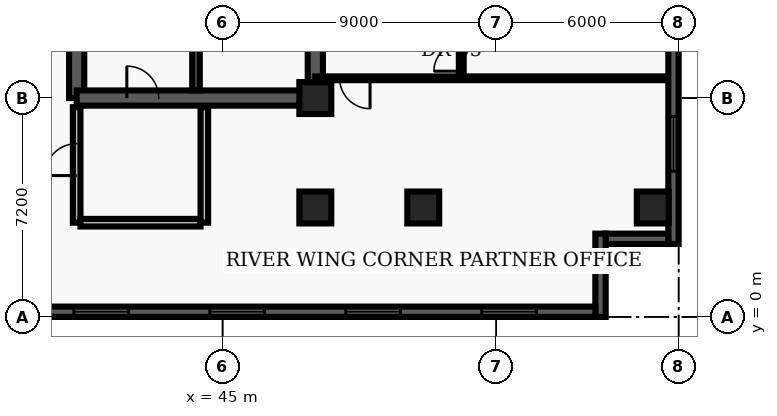
"""IFC4 building model, lengths in metres.
Left out: names, types, materials, properties, quantities, classifications, styles, units other than length and angle.
Written with IfcOpenShell. Run it as: python <this file> out.ifc"""

import sys

from ifc_helpers import new_model, entity, si_unit, converted_unit, direction, frame, origin_with_axes, origin_2d_with_axis, place, context, subcontext, project, spatial, polyline, rectangle, outline, extrude, element, fill, save


model = new_model("IFC4")
c1 = context("Model", 3, precision=1e-05, world=origin_with_axes(), true_north=direction((0.0, 1.0)))
c2 = subcontext(c1, "Body", "Model", "MODEL_VIEW")
j1 = project(units=[si_unit("LENGTHUNIT", "METRE"), converted_unit("PLANEANGLEUNIT", "DEGREE", entity("IfcPlaneAngleMeasure", 0.017), si_unit("PLANEANGLEUNIT", "RADIAN"), dimensions=[0, 0, 0, 0, 0, 0, 0])], contexts=[c1])
p1 = place(None, origin_with_axes())
s1 = spatial("IfcSite", under=j1, at=p1, CompositionType="ELEMENT")
p2 = place(p1, origin_with_axes())
s2 = spatial("IfcBuilding", under=s1, at=p2, CompositionType="ELEMENT")
p3 = place(p2, frame((0.0, 0.0, 183.6), z_axis=(0.0, 0.0, 1.0), x_axis=(1.0, 0.0, 0.0)))
s3 = spatial("IfcBuildingStorey", under=s2, at=p3, CompositionType="ELEMENT", Elevation=183.6)
p4 = place(p3, frame((40.2, 7.2, 0.0), z_axis=(0.0, 0.0, 1.0), x_axis=(0.0, 1.0, 0.0)))
e1 = element("IfcWall", 1, at=p4, inside=s3, PredefinedType="SHEAR", context=c2, shape_type="SweptSolid", body=[
    extrude(outline(polyline([(0.0, -0.25), (15.6, -0.25), (15.6, 0.25), (0.0, 0.25), (0.0, -0.25)])), origin_with_axes(), (0.0, 0.0, 1.0), 3.6),
])
p5 = place(p4, frame((14.475, 0.0, 0.0), z_axis=(0.0, 0.0, 1.0), x_axis=(1.0, 0.0, 0.0)))
e2 = element("IfcOpeningElement", 2, at=p5, cuts=e1, PredefinedType="OPENING", context=c2, shape_type="SweptSolid", body=[
    extrude(rectangle(XDim=1.05, YDim=0.52, at=origin_2d_with_axis()), origin_with_axes(), (0.0, 0.0, 1.0), 2.15),
])
p6 = place(p4, frame((12.75, 0.0, 0.0), z_axis=(0.0, 0.0, 1.0), x_axis=(1.0, 0.0, 0.0)))
e3 = element("IfcOpeningElement", 3, at=p6, cuts=e1, PredefinedType="OPENING", context=c2, shape_type="SweptSolid", body=[
    extrude(rectangle(XDim=1.2, YDim=0.52, at=origin_2d_with_axis()), origin_with_axes(), (0.0, 0.0, 1.0), 2.15),
])
p7 = place(p4, frame((9.3, 0.0, 0.0), z_axis=(0.0, 0.0, 1.0), x_axis=(1.0, 0.0, 0.0)))
e4 = element("IfcOpeningElement", 4, at=p7, cuts=e1, PredefinedType="OPENING", context=c2, shape_type="SweptSolid", body=[
    extrude(rectangle(XDim=0.9, YDim=0.52, at=origin_2d_with_axis()), origin_with_axes(), (0.0, 0.0, 1.0), 2.15),
])
p8 = place(p3, frame((40.2, 7.2, 0.0), z_axis=(0.0, 0.0, 1.0), x_axis=(1.0, 0.0, 0.0)))
e5 = element("IfcWall", 5, at=p8, inside=s3, PredefinedType="SHEAR", context=c2, shape_type="SweptSolid", body=[
    extrude(outline(polyline([(0.0, -0.25), (7.85, -0.25), (7.85, 0.25), (0.0, 0.25), (0.0, -0.25)])), origin_with_axes(), (0.0, 0.0, 1.0), 3.6),
])
p9 = place(p8, frame((2.175, 0.0, 0.0), z_axis=(0.0, 0.0, 1.0), x_axis=(1.0, 0.0, 0.0)))
e6 = element("IfcOpeningElement", 6, at=p9, cuts=e5, PredefinedType="OPENING", context=c2, shape_type="SweptSolid", body=[
    extrude(rectangle(XDim=1.05, YDim=0.52, at=origin_2d_with_axis()), origin_with_axes(), (0.0, 0.0, 1.0), 2.15),
])
p10 = place(p3, frame((48.05, 7.2, 0.0), z_axis=(0.0, 0.0, 1.0), x_axis=(0.0, 1.0, 0.0)))
e7 = element("IfcWall", 7, at=p10, inside=s3, PredefinedType="SHEAR", context=c2, shape_type="SweptSolid", body=[
    extrude(outline(polyline([(0.0, -0.25), (15.6, -0.25), (15.6, 0.25), (0.0, 0.25), (0.0, -0.25)])), origin_with_axes(), (0.0, 0.0, 1.0), 3.6),
])
p11 = place(p10, frame((5.975, 0.0, 0.0), z_axis=(0.0, 0.0, 1.0), x_axis=(1.0, 0.0, 0.0)))
e8 = element("IfcOpeningElement", 8, at=p11, cuts=e7, PredefinedType="OPENING", context=c2, shape_type="SweptSolid", body=[
    extrude(rectangle(XDim=1.05, YDim=0.52, at=origin_2d_with_axis()), origin_with_axes(), (0.0, 0.0, 1.0), 2.15),
])
p12 = place(p10, frame((2.725, 0.0, 0.0), z_axis=(0.0, 0.0, 1.0), x_axis=(1.0, 0.0, 0.0)))
e9 = element("IfcOpeningElement", 9, at=p12, cuts=e7, PredefinedType="OPENING", context=c2, shape_type="SweptSolid", body=[
    extrude(rectangle(XDim=0.95, YDim=0.52, at=origin_2d_with_axis()), origin_with_axes(), (0.0, 0.0, 1.0), 2.15),
])
p13 = place(p3, frame((44.125, 7.45, 0.0), z_axis=(0.0, 0.0, 1.0), x_axis=(0.0, 1.0, 0.0)))
e10 = element("IfcWall", 10, at=p13, inside=s3, PredefinedType="SHEAR", context=c2, shape_type="SweptSolid", body=[
    extrude(outline(polyline([(0.0, -0.125), (15.1, -0.125), (15.1, 0.125), (0.0, 0.125), (0.0, -0.125)])), origin_with_axes(), (0.0, 0.0, 1.0), 3.6),
])
p14 = place(p3, frame((40.2, 3.1, 0.0), z_axis=(0.0, 0.0, 1.0), x_axis=(0.0, 1.0, 0.0)))
e11 = element("IfcWall", 11, at=p14, inside=s3, PredefinedType="SOLIDWALL", context=c2, shape_type="SweptSolid", body=[
    extrude(outline(polyline([(0.0, -0.125), (3.8, -0.125), (3.8, 0.125), (0.0, 0.125), (0.0, -0.125)])), origin_with_axes(), (0.0, 0.0, 1.0), 2.64),
])
p15 = place(p14, frame((2.075, 0.0, 0.0), z_axis=(0.0, 0.0, 1.0), x_axis=(1.0, 0.0, 0.0)))
e12 = element("IfcOpeningElement", 12, at=p15, cuts=e11, PredefinedType="OPENING", context=c2, shape_type="SweptSolid", body=[
    extrude(rectangle(XDim=1.05, YDim=0.27, at=origin_2d_with_axis()), origin_with_axes(), (0.0, 0.0, 1.0), 2.15),
])
p16 = place(p3, frame((40.325, 3.1, 0.0), z_axis=(0.0, 0.0, 1.0), x_axis=(1.0, 0.0, 0.0)))
e13 = element("IfcWall", 13, at=p16, inside=s3, PredefinedType="SOLIDWALL", context=c2, shape_type="SweptSolid", body=[
    extrude(outline(polyline([(0.0, -0.125), (3.95, -0.125), (3.95, 0.125), (0.0, 0.125), (0.0, -0.125)])), origin_with_axes(), (0.0, 0.0, 1.0), 2.64),
])
p17 = place(p3, frame((44.4, 3.1, 0.0), z_axis=(0.0, 0.0, 1.0), x_axis=(0.0, 1.0, 0.0)))
e14 = element("IfcWall", 14, at=p17, inside=s3, PredefinedType="SOLIDWALL", context=c2, shape_type="SweptSolid", body=[
    extrude(outline(polyline([(0.0, -0.125), (3.8, -0.125), (3.8, 0.125), (0.0, 0.125), (0.0, -0.125)])), origin_with_axes(), (0.0, 0.0, 1.0), 2.64),
])
for number, where, z_axis, x_axis in (
    (15, (48.05, 3.6, 0.0), (0.0, 0.0, 1.0), (1.0, 0.0, 0.0)),
    (16, (48.05, 7.2, 0.0), (0.0, 0.0, 1.0), (1.0, 0.0, 0.0)),
    (17, (51.6, 3.6, 0.0), (0.0, 0.0, 1.0), (1.0, 0.0, 0.0)),
    (18, (59.15, 3.6, 0.0), (0.0, 0.0, 1.0), (1.0, 0.0, 0.0)),
):
    element("IfcColumn", number, at=place(p3, frame(where, z_axis=z_axis, x_axis=x_axis)), inside=s3, PredefinedType="COLUMN", context=c2, shape_type="SweptSolid", body=[
        extrude(rectangle(XDim=1.05, YDim=1.05, at=origin_2d_with_axis()), origin_with_axes(), (0.0, 0.0, 1.0), 3.9),
    ])
p18 = place(p3, frame((52.85, 7.85, 0.0), z_axis=(0.0, 0.0, 1.0), x_axis=(0.0, 1.0, 0.0)))
e19 = element("IfcWall", 19, at=p18, inside=s3, PredefinedType="PARTITIONING", context=c2, shape_type="SweptSolid", body=[
    extrude(outline(polyline([(0.0, -0.08), (18.8, -0.08), (18.8, 0.08), (0.0, 0.08), (0.0, -0.08)])), origin_with_axes(), (0.0, 0.0, 1.0), 2.64),
])
p19 = place(p18, frame((0.684, 0.0, 0.0), z_axis=(0.0, 0.0, 1.0), x_axis=(1.0, 0.0, 0.0)))
e20 = element("IfcOpeningElement", 20, at=p19, cuts=e19, PredefinedType="OPENING", context=c2, shape_type="SweptSolid", body=[
    extrude(rectangle(XDim=0.9, YDim=0.18, at=origin_2d_with_axis()), origin_with_axes(), (0.0, 0.0, 1.0), 2.15),
])
p20 = place(p18, frame((5.907, 0.0, 0.0), z_axis=(0.0, 0.0, 1.0), x_axis=(1.0, 0.0, 0.0)))
e21 = element("IfcOpeningElement", 21, at=p20, cuts=e19, PredefinedType="OPENING", context=c2, shape_type="SweptSolid", body=[
    extrude(rectangle(XDim=1.0, YDim=0.18, at=origin_2d_with_axis()), origin_with_axes(), (0.0, 0.0, 1.0), 2.15),
])
p21 = place(p18, frame((11.368, 0.0, 0.0), z_axis=(0.0, 0.0, 1.0), x_axis=(1.0, 0.0, 0.0)))
e22 = element("IfcOpeningElement", 22, at=p21, cuts=e19, PredefinedType="OPENING", context=c2, shape_type="SweptSolid", body=[
    extrude(rectangle(XDim=1.0, YDim=0.18, at=origin_2d_with_axis()), origin_with_axes(), (0.0, 0.0, 1.0), 2.15),
])
p22 = place(p18, frame((14.204, 0.0, 0.0), z_axis=(0.0, 0.0, 1.0), x_axis=(1.0, 0.0, 0.0)))
e23 = element("IfcOpeningElement", 23, at=p22, cuts=e19, PredefinedType="OPENING", context=c2, shape_type="SweptSolid", body=[
    extrude(rectangle(XDim=1.0, YDim=0.18, at=origin_2d_with_axis()), origin_with_axes(), (0.0, 0.0, 1.0), 2.15),
])
p23 = place(p3, frame((59.665, 7.85, 0.0), z_axis=(0.0, 0.0, 1.0), x_axis=(-1.0, 0.0, 0.0)))
e24 = element("IfcWall", 24, at=p23, inside=s3, PredefinedType="PARTITIONING", context=c2, shape_type="SweptSolid", body=[
    extrude(outline(polyline([(0.0, -0.062), (11.615, -0.062), (11.615, 0.062), (0.0, 0.062), (0.0, -0.062)])), origin_with_axes(), (0.0, 0.0, 1.0), 2.64),
])
p24 = place(p23, frame((10.315, 0.0, 0.0), z_axis=(0.0, 0.0, 1.0), x_axis=(1.0, 0.0, 0.0)))
e25 = element("IfcOpeningElement", 25, at=p24, cuts=e24, PredefinedType="OPENING", context=c2, shape_type="SweptSolid", body=[
    extrude(rectangle(XDim=1.0, YDim=0.145, at=origin_2d_with_axis()), origin_with_axes(), (0.0, 0.0, 1.0), 2.15),
])
p25 = place(p3, frame((59.83, 26.06, 0.0), z_axis=(0.0, 0.0, 1.0), x_axis=(0.0, -1.0, 0.0)))
e26 = element("IfcWall", 26, at=p25, inside=s3, PredefinedType="SOLIDWALL", context=c2, shape_type="SweptSolid", body=[
    extrude(outline(polyline([(0.0, -0.17), (23.66, -0.17), (23.66, 0.17), (0.0, 0.17), (0.0, -0.17)])), origin_with_axes(), (0.0, 0.0, 1.0), 3.6),
])
p26 = place(p25, frame((3.696, 0.0, 0.45), z_axis=(0.0, 0.0, 1.0), x_axis=(1.0, 0.0, 0.0)))
e27 = element("IfcOpeningElement", 27, at=p26, cuts=e26, PredefinedType="OPENING", context=c2, shape_type="SweptSolid", body=[
    extrude(rectangle(XDim=1.8, YDim=0.36, at=origin_2d_with_axis()), origin_with_axes(), (0.0, 0.0, 1.0), 2.1),
])
p27 = place(p25, frame((11.83, 0.0, 0.45), z_axis=(0.0, 0.0, 1.0), x_axis=(1.0, 0.0, 0.0)))
e28 = element("IfcOpeningElement", 28, at=p27, cuts=e26, PredefinedType="OPENING", context=c2, shape_type="SweptSolid", body=[
    extrude(rectangle(XDim=1.8, YDim=0.36, at=origin_2d_with_axis()), origin_with_axes(), (0.0, 0.0, 1.0), 2.1),
])
p28 = place(p25, frame((20.364, 0.0, 0.45), z_axis=(0.0, 0.0, 1.0), x_axis=(1.0, 0.0, 0.0)))
e29 = element("IfcOpeningElement", 29, at=p28, cuts=e26, PredefinedType="OPENING", context=c2, shape_type="SweptSolid", body=[
    extrude(rectangle(XDim=1.8, YDim=0.36, at=origin_2d_with_axis()), origin_with_axes(), (0.0, 0.0, 1.0), 2.1),
])
p29 = place(p3, frame((59.66, 2.57, 0.0), z_axis=(0.0, 0.0, 1.0), x_axis=(-1.0, 0.0, 0.0)))
e30 = element("IfcWall", 30, at=p29, inside=s3, PredefinedType="SOLIDWALL", context=c2, shape_type="SweptSolid", body=[
    extrude(outline(polyline([(0.0, -0.17), (2.06, -0.17), (2.06, 0.17), (0.0, 0.17), (0.0, -0.17)])), origin_with_axes(), (0.0, 0.0, 1.0), 3.6),
])
p30 = place(p3, frame((57.43, 2.74, 0.0), z_axis=(0.0, 0.0, 1.0), x_axis=(0.0, -1.0, 0.0)))
e31 = element("IfcWall", 31, at=p30, inside=s3, PredefinedType="SOLIDWALL", context=c2, shape_type="SweptSolid", body=[
    extrude(outline(polyline([(0.0, -0.17), (2.74, -0.17), (2.74, 0.17), (0.0, 0.17), (0.0, -0.17)])), origin_with_axes(), (0.0, 0.0, 1.0), 3.6),
])
p31 = place(p3, frame((57.26, 0.17, 0.0), z_axis=(0.0, 0.0, 1.0), x_axis=(-1.0, 0.0, 0.0)))
e32 = element("IfcWall", 32, at=p31, inside=s3, PredefinedType="SOLIDWALL", context=c2, shape_type="SweptSolid", body=[
    extrude(outline(polyline([(0.0, -0.17), (54.86, -0.17), (54.86, 0.17), (0.0, 0.17), (0.0, -0.17)])), origin_with_axes(), (0.0, 0.0, 1.0), 3.6),
])
p32 = place(p31, frame((2.836, 0.0, 0.45), z_axis=(0.0, 0.0, 1.0), x_axis=(1.0, 0.0, 0.0)))
e33 = element("IfcOpeningElement", 33, at=p32, cuts=e32, PredefinedType="OPENING", context=c2, shape_type="SweptSolid", body=[
    extrude(rectangle(XDim=1.8, YDim=0.36, at=origin_2d_with_axis()), origin_with_axes(), (0.0, 0.0, 1.0), 2.1),
])
p33 = place(p31, frame((7.307, 0.0, 0.45), z_axis=(0.0, 0.0, 1.0), x_axis=(1.0, 0.0, 0.0)))
e34 = element("IfcOpeningElement", 34, at=p33, cuts=e32, PredefinedType="OPENING", context=c2, shape_type="SweptSolid", body=[
    extrude(rectangle(XDim=1.8, YDim=0.36, at=origin_2d_with_axis()), origin_with_axes(), (0.0, 0.0, 1.0), 2.1),
])
p34 = place(p31, frame((11.779, 0.0, 0.45), z_axis=(0.0, 0.0, 1.0), x_axis=(1.0, 0.0, 0.0)))
e35 = element("IfcOpeningElement", 35, at=p34, cuts=e32, PredefinedType="OPENING", context=c2, shape_type="SweptSolid", body=[
    extrude(rectangle(XDim=1.8, YDim=0.36, at=origin_2d_with_axis()), origin_with_axes(), (0.0, 0.0, 1.0), 2.1),
])
p35 = place(p31, frame((16.251, 0.0, 0.45), z_axis=(0.0, 0.0, 1.0), x_axis=(1.0, 0.0, 0.0)))
e36 = element("IfcOpeningElement", 36, at=p35, cuts=e32, PredefinedType="OPENING", context=c2, shape_type="SweptSolid", body=[
    extrude(rectangle(XDim=1.8, YDim=0.36, at=origin_2d_with_axis()), origin_with_axes(), (0.0, 0.0, 1.0), 2.1),
])
p36 = place(p31, frame((20.723, 0.0, 0.45), z_axis=(0.0, 0.0, 1.0), x_axis=(1.0, 0.0, 0.0)))
e37 = element("IfcOpeningElement", 37, at=p36, cuts=e32, PredefinedType="OPENING", context=c2, shape_type="SweptSolid", body=[
    extrude(rectangle(XDim=1.8, YDim=0.36, at=origin_2d_with_axis()), origin_with_axes(), (0.0, 0.0, 1.0), 2.1),
])
p37 = place(p31, frame((25.644, 0.0, 0.45), z_axis=(0.0, 0.0, 1.0), x_axis=(1.0, 0.0, 0.0)))
e38 = element("IfcOpeningElement", 38, at=p37, cuts=e32, PredefinedType="OPENING", context=c2, shape_type="SweptSolid", body=[
    extrude(rectangle(XDim=1.8, YDim=0.36, at=origin_2d_with_axis()), origin_with_axes(), (0.0, 0.0, 1.0), 2.1),
])
p38 = place(p31, frame((34.138, 0.0, 0.45), z_axis=(0.0, 0.0, 1.0), x_axis=(1.0, 0.0, 0.0)))
e39 = element("IfcOpeningElement", 39, at=p38, cuts=e32, PredefinedType="OPENING", context=c2, shape_type="SweptSolid", body=[
    extrude(rectangle(XDim=1.8, YDim=0.36, at=origin_2d_with_axis()), origin_with_axes(), (0.0, 0.0, 1.0), 2.1),
])
p39 = place(p31, frame((38.609, 0.0, 0.45), z_axis=(0.0, 0.0, 1.0), x_axis=(1.0, 0.0, 0.0)))
e40 = element("IfcOpeningElement", 40, at=p39, cuts=e32, PredefinedType="OPENING", context=c2, shape_type="SweptSolid", body=[
    extrude(rectangle(XDim=1.8, YDim=0.36, at=origin_2d_with_axis()), origin_with_axes(), (0.0, 0.0, 1.0), 2.1),
])
p40 = place(p31, frame((43.081, 0.0, 0.45), z_axis=(0.0, 0.0, 1.0), x_axis=(1.0, 0.0, 0.0)))
e41 = element("IfcOpeningElement", 41, at=p40, cuts=e32, PredefinedType="OPENING", context=c2, shape_type="SweptSolid", body=[
    extrude(rectangle(XDim=1.8, YDim=0.36, at=origin_2d_with_axis()), origin_with_axes(), (0.0, 0.0, 1.0), 2.1),
])
p41 = place(p31, frame((52.024, 0.0, 0.45), z_axis=(0.0, 0.0, 1.0), x_axis=(1.0, 0.0, 0.0)))
e42 = element("IfcOpeningElement", 42, at=p41, cuts=e32, PredefinedType="OPENING", context=c2, shape_type="SweptSolid", body=[
    extrude(rectangle(XDim=1.8, YDim=0.36, at=origin_2d_with_axis()), origin_with_axes(), (0.0, 0.0, 1.0), 2.1),
])
p42 = place(p8, frame((2.175, 0.0, 0.0), z_axis=(0.0, 0.0, 1.0), x_axis=(1.0, 0.0, 0.0)))
e43 = element("IfcDoor", 43, at=p42, inside=s3, OperationType="SINGLE_SWING_LEFT", PredefinedType="DOOR", context=c2, shape_type="SweptSolid", body=[
    extrude(rectangle(XDim=1.05, YDim=0.09, at=origin_2d_with_axis()), origin_with_axes(), (0.0, 0.0, 1.0), 2.15),
])
fill(e6, e43)
p43 = place(p14, frame((2.075, 0.0, 0.0), z_axis=(0.0, 0.0, 1.0), x_axis=(1.0, 0.0, 0.0)))
e44 = element("IfcDoor", 44, at=p43, inside=s3, OperationType="SINGLE_SWING_LEFT", PredefinedType="DOOR", context=c2, shape_type="SweptSolid", body=[
    extrude(rectangle(XDim=1.05, YDim=0.09, at=origin_2d_with_axis()), origin_with_axes(), (0.0, 0.0, 1.0), 2.15),
])
fill(e12, e44)
p44 = place(p23, frame((10.315, 0.0, 0.0), z_axis=(0.0, 0.0, 1.0), x_axis=(1.0, 0.0, 0.0)))
e45 = element("IfcDoor", 45, at=p44, inside=s3, OperationType="SINGLE_SWING_LEFT", PredefinedType="DOOR", context=c2, shape_type="SweptSolid", body=[
    extrude(rectangle(XDim=1.0, YDim=0.075, at=origin_2d_with_axis()), origin_with_axes(), (0.0, 0.0, 1.0), 2.15),
])
fill(e25, e45)
p45 = place(p18, frame((0.684, 0.0, 0.0), z_axis=(0.0, 0.0, 1.0), x_axis=(1.0, 0.0, 0.0)))
e46 = element("IfcDoor", 46, at=p45, inside=s3, OperationType="SINGLE_SWING_LEFT", PredefinedType="DOOR", context=c2, shape_type="SweptSolid", body=[
    extrude(rectangle(XDim=0.9, YDim=0.09, at=origin_2d_with_axis()), origin_with_axes(), (0.0, 0.0, 1.0), 2.15),
])
fill(e20, e46)
p46 = place(p25, frame((20.364, 0.0, 0.45), z_axis=(0.0, 0.0, 1.0), x_axis=(1.0, 0.0, 0.0)))
e47 = element("IfcWindow", 47, at=p46, inside=s3, PredefinedType="WINDOW", context=c2, shape_type="SweptSolid", body=[
    extrude(rectangle(XDim=1.8, YDim=0.09, at=origin_2d_with_axis()), origin_with_axes(), (0.0, 0.0, 1.0), 2.1),
])
fill(e29, e47)
p47 = place(p31, frame((2.836, 0.0, 0.45), z_axis=(0.0, 0.0, 1.0), x_axis=(1.0, 0.0, 0.0)))
e48 = element("IfcWindow", 48, at=p47, inside=s3, PredefinedType="WINDOW", context=c2, shape_type="SweptSolid", body=[
    extrude(rectangle(XDim=1.8, YDim=0.09, at=origin_2d_with_axis()), origin_with_axes(), (0.0, 0.0, 1.0), 2.1),
])
fill(e33, e48)
p48 = place(p31, frame((7.307, 0.0, 0.45), z_axis=(0.0, 0.0, 1.0), x_axis=(1.0, 0.0, 0.0)))
e49 = element("IfcWindow", 49, at=p48, inside=s3, PredefinedType="WINDOW", context=c2, shape_type="SweptSolid", body=[
    extrude(rectangle(XDim=1.8, YDim=0.09, at=origin_2d_with_axis()), origin_with_axes(), (0.0, 0.0, 1.0), 2.1),
])
fill(e34, e49)
p49 = place(p31, frame((11.779, 0.0, 0.45), z_axis=(0.0, 0.0, 1.0), x_axis=(1.0, 0.0, 0.0)))
e50 = element("IfcWindow", 50, at=p49, inside=s3, PredefinedType="WINDOW", context=c2, shape_type="SweptSolid", body=[
    extrude(rectangle(XDim=1.8, YDim=0.09, at=origin_2d_with_axis()), origin_with_axes(), (0.0, 0.0, 1.0), 2.1),
])
fill(e35, e50)
p50 = place(p31, frame((16.251, 0.0, 0.45), z_axis=(0.0, 0.0, 1.0), x_axis=(1.0, 0.0, 0.0)))
e51 = element("IfcWindow", 51, at=p50, inside=s3, PredefinedType="WINDOW", context=c2, shape_type="SweptSolid", body=[
    extrude(rectangle(XDim=1.8, YDim=0.09, at=origin_2d_with_axis()), origin_with_axes(), (0.0, 0.0, 1.0), 2.1),
])
fill(e36, e51)
save(model, sys.argv[1])
